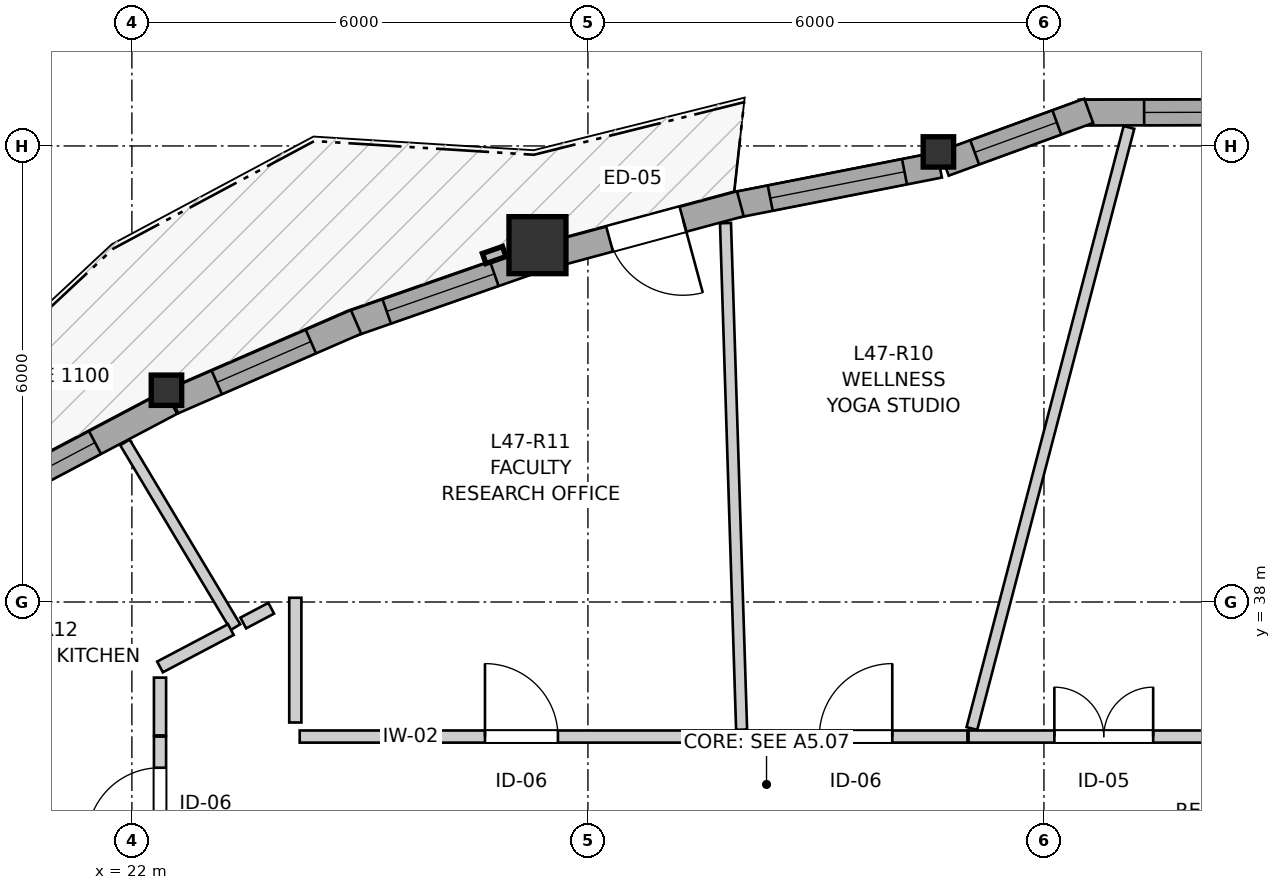
"""IFC4 building model, lengths in metres.
Left out: names, types, materials, properties, quantities, classifications, styles, units other than length and angle.
Written with IfcOpenShell. Run it as: python <this file> out.ifc"""

import sys

from ifc_helpers import new_model, si_unit, direction, frame, frame_2d, origin, origin_2d, place, context, subcontext, project, spatial, rectangle, i_section, extrude, source, transform, mapped, element, fill, save


model = new_model("IFC4")
c1 = context("Model", 3, precision=1e-05, world=origin(), true_north=direction((0.0, 1.0)))
c2 = subcontext(c1, "Body", "Model", "MODEL_VIEW")
j1 = project(units=[si_unit("LENGTHUNIT", "METRE"), si_unit("PLANEANGLEUNIT", "RADIAN")], contexts=[c1])
p1 = place(None, origin())
s1 = spatial("IfcSite", under=j1, at=p1, CompositionType="ELEMENT")
p2 = place(p1, origin())
s2 = spatial("IfcBuilding", under=s1, at=p2, CompositionType="ELEMENT")
p3 = place(p2, frame((0.0, 0.0, 158.6)))
s3 = spatial("IfcBuildingStorey", under=s2, at=p3, CompositionType="ELEMENT", Elevation=158.6)
m1 = source(origin(), c2, "Body", "SweptSolid", [
    extrude(i_section(OverallWidth=0.401, OverallDepth=0.399, WebThickness=0.023, FlangeThickness=0.036, FilletRadius=0.015, at=origin_2d()), origin(), (0.0, 0.0, 1.0), 2.95),
])
p4 = place(p3, frame((32.611, 43.922, 0.0), z_axis=(0.0, 0.0, 1.0), x_axis=(1.0, 0.0, 0.0)))
e1 = element("IfcColumn", 1, at=p4, inside=s3, PredefinedType="PILASTER", context=c2, shape_type="MappedRepresentation", body=[
    mapped(m1, transform((0.0, 0.0, 0.0), x_axis=(1.0, 0.0, 0.0), y_axis=(0.0, 1.0, 0.0), z_axis=(0.0, 0.0, 1.0), scale=1.0)),
])
m2 = source(origin(), c2, "Body", "SweptSolid", [
    extrude(rectangle(XDim=0.75, YDim=0.75, at=origin_2d()), origin(), (0.0, 0.0, 1.0), 2.95),
])
p5 = place(p3, frame((27.336, 42.695, 0.0), z_axis=(0.0, 0.0, 1.0), x_axis=(1.0, 0.0, 0.0)))
e2 = element("IfcColumn", 2, at=p5, inside=s3, PredefinedType="COLUMN", context=c2, shape_type="MappedRepresentation", body=[
    mapped(m2, transform((0.0, 0.0, 0.0), x_axis=(1.0, 0.0, 0.0), y_axis=(0.0, 1.0, 0.0), z_axis=(0.0, 0.0, 1.0), scale=1.0)),
])
p6 = place(p3, frame((22.455, 40.786, 0.0), z_axis=(0.0, 0.0, 1.0), x_axis=(1.0, 0.0, 0.0)))
e3 = element("IfcColumn", 3, at=p6, inside=s3, PredefinedType="PILASTER", context=c2, shape_type="MappedRepresentation", body=[
    mapped(m1, transform((0.0, 0.0, 0.0), x_axis=(1.0, 0.0, 0.0), y_axis=(0.0, 1.0, 0.0), z_axis=(0.0, 0.0, 1.0), scale=1.0)),
])
p7 = place(p3, frame((36.538, 44.444, 0.0), z_axis=(0.0, 0.0, 1.0), x_axis=(-0.999997247411, -0.002346309825, 0.0)))
e4 = element("IfcWall", 4, at=p7, inside=s3, PredefinedType="SOLIDWALL", context=c2, shape_type="SweptSolid", body=[
    extrude(rectangle(XDim=2.081, YDim=0.34, at=frame_2d((1.041, 0.0))), origin(), (0.0, 0.0, 1.0), 2.53),
])
p8 = place(p7, frame((0.271, 0.0, 0.82)))
e5 = element("IfcOpeningElement", 5, at=p8, cuts=e4, PredefinedType="OPENING", context=c2, shape_type="SweptSolid", body=[
    extrude(rectangle(XDim=0.95, YDim=1.35, at=frame_2d((0.475, 0.675))), frame((0.0, 0.18, 0.0), z_axis=(0.0, -1.0, 0.0), x_axis=(1.0, 0.0, 0.0)), (0.0, 0.0, 1.0), 0.36),
])
p9 = place(p3, frame((34.589, 44.462, 0.0), z_axis=(0.0, 0.0, 1.0), x_axis=(-0.939387553708, -0.342857148007, 0.0)))
e6 = element("IfcWall", 6, at=p9, inside=s3, PredefinedType="SOLIDWALL", context=c2, shape_type="SweptSolid", body=[
    extrude(rectangle(XDim=2.023, YDim=0.34, at=frame_2d((1.011, 0.0))), origin(), (0.0, 0.0, 1.0), 2.53),
])
p10 = place(p9, frame((0.447, 0.0, 0.82)))
e7 = element("IfcOpeningElement", 7, at=p10, cuts=e6, PredefinedType="OPENING", context=c2, shape_type="SweptSolid", body=[
    extrude(rectangle(XDim=1.15, YDim=1.2, at=frame_2d((0.575, 0.6))), frame((0.0, 0.18, 0.0), z_axis=(0.0, -1.0, 0.0), x_axis=(1.0, 0.0, 0.0)), (0.0, 0.0, 1.0), 0.36),
])
p11 = place(p3, frame((32.625, 43.751, 0.0), z_axis=(0.0, 0.0, 1.0), x_axis=(-0.981232663103, -0.192827541756, 0.0)))
e8 = element("IfcWall", 8, at=p11, inside=s3, PredefinedType="SOLIDWALL", context=c2, shape_type="SweptSolid", body=[
    extrude(rectangle(XDim=2.756, YDim=0.34, at=frame_2d((1.378, 0.0))), origin(), (0.0, 0.0, 1.0), 2.53),
])
p12 = place(p11, frame((0.468, 0.0, 0.82)))
e9 = element("IfcOpeningElement", 9, at=p12, cuts=e8, PredefinedType="OPENING", context=c2, shape_type="SweptSolid", body=[
    extrude(rectangle(XDim=1.8, YDim=1.45, at=frame_2d((0.9, 0.725))), frame((0.0, 0.18, 0.0), z_axis=(0.0, -1.0, 0.0), x_axis=(1.0, 0.0, 0.0)), (0.0, 0.0, 1.0), 0.36),
])
p13 = place(p3, frame((30.006, 43.24, 0.0), z_axis=(0.0, 0.0, 1.0), x_axis=(-0.965448248334, -0.260594857563, 0.0)))
e10 = element("IfcWall", 10, at=p13, inside=s3, PredefinedType="SOLIDWALL", context=c2, shape_type="SweptSolid", body=[
    extrude(rectangle(XDim=2.564, YDim=0.34, at=frame_2d((1.282, 0.0))), origin(), (0.0, 0.0, 1.0), 2.53),
])
p14 = place(p13, frame((0.782, 0.0, 0.0)))
e11 = element("IfcOpeningElement", 11, at=p14, cuts=e10, PredefinedType="OPENING", context=c2, shape_type="SweptSolid", body=[
    extrude(rectangle(XDim=1.0, YDim=2.1, at=frame_2d((0.5, 1.05))), frame((0.0, 0.18, 0.0), z_axis=(0.0, -1.0, 0.0), x_axis=(1.0, 0.0, 0.0)), (0.0, 0.0, 1.0), 0.36),
])
p15 = place(p3, frame((27.246, 42.483, 0.0), z_axis=(0.0, 0.0, 1.0), x_axis=(-0.944132901201, -0.32956496305, 0.0)))
e12 = element("IfcWall", 12, at=p15, inside=s3, PredefinedType="SOLIDWALL", context=c2, shape_type="SweptSolid", body=[
    extrude(rectangle(XDim=2.52, YDim=0.34, at=frame_2d((1.26, 0.0))), origin(), (0.0, 0.0, 1.0), 2.53),
])
p16 = place(p15, frame((0.505, 0.0, 0.82)))
e13 = element("IfcOpeningElement", 13, at=p16, cuts=e12, PredefinedType="OPENING", context=c2, shape_type="SweptSolid", body=[
    extrude(rectangle(XDim=1.5, YDim=1.45, at=frame_2d((0.75, 0.725))), frame((0.0, 0.18, 0.0), z_axis=(0.0, -1.0, 0.0), x_axis=(1.0, 0.0, 0.0)), (0.0, 0.0, 1.0), 0.36),
])
p17 = place(p3, frame((24.949, 41.685, 0.0), z_axis=(0.0, 0.0, 1.0), x_axis=(-0.917112921707, -0.398627506373, 0.0)))
e14 = element("IfcWall", 14, at=p17, inside=s3, PredefinedType="SOLIDWALL", context=c2, shape_type="SweptSolid", body=[
    extrude(rectangle(XDim=2.625, YDim=0.34, at=frame_2d((1.313, 0.0))), origin(), (0.0, 0.0, 1.0), 2.53),
])
p18 = place(p17, frame((0.648, 0.0, 0.82)))
e15 = element("IfcOpeningElement", 15, at=p18, cuts=e14, PredefinedType="OPENING", context=c2, shape_type="SweptSolid", body=[
    extrude(rectangle(XDim=1.35, YDim=1.45, at=frame_2d((0.675, 0.725))), frame((0.0, 0.18, 0.0), z_axis=(0.0, -1.0, 0.0), x_axis=(1.0, 0.0, 0.0)), (0.0, 0.0, 1.0), 0.36),
])
p19 = place(p3, frame((22.517, 40.627, 0.0), z_axis=(0.0, 0.0, 1.0), x_axis=(-0.884374030812, -0.466778934427, 0.0)))
e16 = element("IfcWall", 16, at=p19, inside=s3, PredefinedType="SOLIDWALL", context=c2, shape_type="SweptSolid", body=[
    extrude(rectangle(XDim=2.611, YDim=0.34, at=frame_2d((1.306, 0.0))), origin(), (0.0, 0.0, 1.0), 2.53),
])
p20 = place(p19, frame((1.133, 0.0, 0.82)))
e17 = element("IfcOpeningElement", 17, at=p20, cuts=e16, PredefinedType="OPENING", context=c2, shape_type="SweptSolid", body=[
    extrude(rectangle(XDim=1.05, YDim=1.45, at=frame_2d((0.525, 0.725))), frame((0.0, 0.18, 0.0), z_axis=(0.0, -1.0, 0.0), x_axis=(1.0, 0.0, 0.0)), (0.0, 0.0, 1.0), 0.36),
])
p21 = place(p3, frame((24.208, 36.23, 0.0), z_axis=(0.0, 0.0, 1.0), x_axis=(1.0, 0.0, 0.0)))
e18 = element("IfcWall", 18, at=p21, inside=s3, PredefinedType="PARTITIONING", context=c2, shape_type="SweptSolid", body=[
    extrude(rectangle(XDim=5.832, YDim=0.16, at=frame_2d((2.916, 0.0))), origin(), (0.0, 0.0, 1.0), 2.95),
])
p22 = place(p21, frame((2.438, 0.0, 0.0)))
e19 = element("IfcOpeningElement", 19, at=p22, cuts=e18, PredefinedType="OPENING", context=c2, shape_type="SweptSolid", body=[
    extrude(rectangle(XDim=0.96, YDim=2.1, at=frame_2d((0.48, 1.05))), frame((0.0, 0.09, 0.0), z_axis=(0.0, -1.0, 0.0), x_axis=(1.0, 0.0, 0.0)), (0.0, 0.0, 1.0), 0.18),
])
p23 = place(p3, frame((33.008, 36.23, 0.0), z_axis=(0.0, 0.0, 1.0), x_axis=(1.0, 0.0, 0.0)))
e20 = element("IfcWall", 20, at=p23, inside=s3, PredefinedType="PARTITIONING", context=c2, shape_type="SweptSolid", body=[
    extrude(rectangle(XDim=3.542, YDim=0.16, at=frame_2d((1.771, 0.0))), origin(), (0.0, 0.0, 1.0), 2.588),
])
p24 = place(p23, frame((1.129, 0.0, 0.0)))
e21 = element("IfcOpeningElement", 21, at=p24, cuts=e20, PredefinedType="OPENING", context=c2, shape_type="SweptSolid", body=[
    extrude(rectangle(XDim=1.3, YDim=2.1, at=frame_2d((0.65, 1.05))), frame((0.0, 0.09, 0.0), z_axis=(0.0, -1.0, 0.0), x_axis=(1.0, 0.0, 0.0)), (0.0, 0.0, 1.0), 0.18),
])
p25 = place(p3, frame((30.055, 36.23, 0.0), z_axis=(0.0, 0.0, 1.0), x_axis=(1.0, 0.0, 0.0)))
e22 = element("IfcWall", 22, at=p25, inside=s3, PredefinedType="PARTITIONING", context=c2, shape_type="SweptSolid", body=[
    extrude(rectangle(XDim=2.938, YDim=0.16, at=frame_2d((1.469, 0.0))), origin(), (0.0, 0.0, 1.0), 2.588),
])
p26 = place(p25, frame((0.99, 0.0, 0.0)))
e23 = element("IfcOpeningElement", 23, at=p26, cuts=e22, PredefinedType="OPENING", context=c2, shape_type="SweptSolid", body=[
    extrude(rectangle(XDim=0.96, YDim=2.1, at=frame_2d((0.48, 1.05))), frame((0.0, 0.09, 0.0), z_axis=(0.0, -1.0, 0.0), x_axis=(1.0, 0.0, 0.0)), (0.0, 0.0, 1.0), 0.18),
])
p27 = place(p3, frame((22.37, 34.45, 0.0), z_axis=(0.0, 0.0, 1.0), x_axis=(0.0, 1.0, 0.0)))
e24 = element("IfcWall", 24, at=p27, inside=s3, PredefinedType="PARTITIONING", context=c2, shape_type="SweptSolid", body=[
    extrude(rectangle(XDim=1.78, YDim=0.16, at=frame_2d((0.89, 0.0))), origin(), (0.0, 0.0, 1.0), 2.95),
])
p28 = place(p27, frame((0.41, 0.0, 0.0)))
e25 = element("IfcOpeningElement", 25, at=p28, cuts=e24, PredefinedType="OPENING", context=c2, shape_type="SweptSolid", body=[
    extrude(rectangle(XDim=0.96, YDim=2.1, at=frame_2d((0.48, 1.05))), frame((0.0, 0.09, 0.0), z_axis=(0.0, -1.0, 0.0), x_axis=(1.0, 0.0, 0.0)), (0.0, 0.0, 1.0), 0.18),
])
p29 = place(p3, frame((33.052, 36.336, 0.0), z_axis=(0.0, 0.0, 1.0), x_axis=(0.252838925964, 0.967508386277, 0.0)))
e26 = element("IfcWall", 26, at=p29, inside=s3, PredefinedType="PARTITIONING", context=c2, shape_type="SweptSolid", body=[
    extrude(rectangle(XDim=8.174, YDim=0.145, at=frame_2d((4.087, 0.0))), origin(), (0.0, 0.0, 1.0), 2.95),
])
p30 = place(p3, frame((29.81, 42.985, 0.0), z_axis=(0.0, 0.0, 1.0), x_axis=(0.031815387529, -0.99949376242, 0.0)))
e27 = element("IfcWall", 27, at=p30, inside=s3, PredefinedType="PARTITIONING", context=c2, shape_type="SweptSolid", body=[
    extrude(rectangle(XDim=6.668, YDim=0.145, at=frame_2d((3.334, 0.0))), origin(), (0.0, 0.0, 1.0), 2.95),
])
p31 = place(p3, frame((17.545, 37.432, 0.0), z_axis=(0.0, 0.0, 1.0), x_axis=(0.745965905636, -0.665984134668, 0.0)))
e28 = element("IfcWall", 28, at=p31, inside=s3, PredefinedType="PARTITIONING", context=c2, shape_type="SweptSolid", body=[
    extrude(rectangle(XDim=6.288, YDim=0.145, at=frame_2d((3.144, 0.0))), origin(), (0.0, 0.0, 1.0), 2.95),
])
p32 = place(p3, frame((21.908, 40.1, 0.0), z_axis=(0.0, 0.0, 1.0), x_axis=(0.513582752497, -0.85804006686, 0.0)))
e29 = element("IfcWall", 29, at=p32, inside=s3, PredefinedType="PARTITIONING", context=c2, shape_type="SweptSolid", body=[
    extrude(rectangle(XDim=2.832, YDim=0.145, at=frame_2d((1.416, 0.0))), origin(), (0.0, 0.0, 1.0), 2.95),
])
p33 = place(p3, frame((24.15, 36.415, 0.0), z_axis=(0.0, 0.0, 1.0), x_axis=(0.0, 1.0, 0.0)))
e30 = element("IfcWall", 30, at=p33, inside=s3, PredefinedType="PARTITIONING", context=c2, shape_type="SweptSolid", body=[
    extrude(rectangle(XDim=1.641, YDim=0.16, at=frame_2d((0.82, 0.0))), origin(), (0.0, 0.0, 1.0), 2.95),
])
p34 = place(p3, frame((22.37, 37.146, 0.0), z_axis=(0.0, 0.0, 1.0), x_axis=(0.884530854714, 0.46648168995, 0.0)))
e31 = element("IfcWall", 31, at=p34, inside=s3, PredefinedType="PARTITIONING", context=c2, shape_type="SweptSolid", body=[
    extrude(rectangle(XDim=1.053, YDim=0.16, at=frame_2d((0.527, 0.0))), origin(), (0.0, 0.0, 1.0), 2.558),
])
p35 = place(p3, frame((22.37, 36.245, 0.0), z_axis=(0.0, 0.0, 1.0), x_axis=(0.0, 1.0, 0.0)))
e32 = element("IfcWall", 32, at=p35, inside=s3, PredefinedType="PARTITIONING", context=c2, shape_type="SweptSolid", body=[
    extrude(rectangle(XDim=0.76, YDim=0.16, at=frame_2d((0.38, 0.0))), origin(), (0.0, 0.0, 1.0), 2.95),
])
p36 = place(p3, frame((23.465, 37.724, 0.0), z_axis=(0.0, 0.0, 1.0), x_axis=(0.884344349775, 0.466835164722, 0.0)))
e33 = element("IfcWall", 33, at=p36, inside=s3, PredefinedType="PARTITIONING", context=c2, shape_type="SweptSolid", body=[
    extrude(rectangle(XDim=0.416, YDim=0.16, at=frame_2d((0.208, 0.0))), origin(), (0.0, 0.0, 1.0), 2.558),
])
m3 = source(origin(), c2, "Body", "SweptSolid", [
    extrude(rectangle(XDim=0.95, YDim=1.35, at=frame_2d((0.475, 0.675))), frame((0.0, 0.03, 0.0), z_axis=(0.0, -1.0, 0.0), x_axis=(1.0, 0.0, 0.0)), (0.0, 0.0, 1.0), 0.06),
])
p37 = place(p8, origin())
e34 = element("IfcWindow", 34, at=p37, inside=s3, PartitioningType="SINGLE_PANEL", PredefinedType="WINDOW", context=c2, shape_type="MappedRepresentation", body=[
    mapped(m3, transform((0.0, 0.0, 0.0), x_axis=(1.0, 0.0, 0.0), y_axis=(0.0, 1.0, 0.0), z_axis=(0.0, 0.0, 1.0), scale=1.0)),
])
fill(e5, e34)
m4 = source(origin(), c2, "Body", "SweptSolid", [
    extrude(rectangle(XDim=1.15, YDim=1.2, at=frame_2d((0.575, 0.6))), frame((0.0, 0.03, 0.0), z_axis=(0.0, -1.0, 0.0), x_axis=(1.0, 0.0, 0.0)), (0.0, 0.0, 1.0), 0.06),
])
p38 = place(p10, origin())
e35 = element("IfcWindow", 35, at=p38, inside=s3, PartitioningType="SINGLE_PANEL", PredefinedType="WINDOW", context=c2, shape_type="MappedRepresentation", body=[
    mapped(m4, transform((0.0, 0.0, 0.0), x_axis=(1.0, 0.0, 0.0), y_axis=(0.0, 1.0, 0.0), z_axis=(0.0, 0.0, 1.0), scale=1.0)),
])
fill(e7, e35)
m5 = source(origin(), c2, "Body", "SweptSolid", [
    extrude(rectangle(XDim=1.8, YDim=1.45, at=frame_2d((0.9, 0.725))), frame((0.0, 0.03, 0.0), z_axis=(0.0, -1.0, 0.0), x_axis=(1.0, 0.0, 0.0)), (0.0, 0.0, 1.0), 0.06),
])
p39 = place(p12, origin())
e36 = element("IfcWindow", 36, at=p39, inside=s3, PartitioningType="SINGLE_PANEL", PredefinedType="WINDOW", context=c2, shape_type="MappedRepresentation", body=[
    mapped(m5, transform((0.0, 0.0, 0.0), x_axis=(1.0, 0.0, 0.0), y_axis=(0.0, 1.0, 0.0), z_axis=(0.0, 0.0, 1.0), scale=1.0)),
])
fill(e9, e36)
m6 = source(origin(), c2, "Body", "SweptSolid", [
    extrude(rectangle(XDim=1.5, YDim=1.45, at=frame_2d((0.75, 0.725))), frame((0.0, 0.03, 0.0), z_axis=(0.0, -1.0, 0.0), x_axis=(1.0, 0.0, 0.0)), (0.0, 0.0, 1.0), 0.06),
])
p40 = place(p16, origin())
e37 = element("IfcWindow", 37, at=p40, inside=s3, PartitioningType="SINGLE_PANEL", PredefinedType="WINDOW", context=c2, shape_type="MappedRepresentation", body=[
    mapped(m6, transform((0.0, 0.0, 0.0), x_axis=(1.0, 0.0, 0.0), y_axis=(0.0, 1.0, 0.0), z_axis=(0.0, 0.0, 1.0), scale=1.0)),
])
fill(e13, e37)
m7 = source(origin(), c2, "Body", "SweptSolid", [
    extrude(rectangle(XDim=1.35, YDim=1.45, at=frame_2d((0.675, 0.725))), frame((0.0, 0.03, 0.0), z_axis=(0.0, -1.0, 0.0), x_axis=(1.0, 0.0, 0.0)), (0.0, 0.0, 1.0), 0.06),
])
p41 = place(p18, origin())
e38 = element("IfcWindow", 38, at=p41, inside=s3, PartitioningType="SINGLE_PANEL", PredefinedType="WINDOW", context=c2, shape_type="MappedRepresentation", body=[
    mapped(m7, transform((0.0, 0.0, 0.0), x_axis=(1.0, 0.0, 0.0), y_axis=(0.0, 1.0, 0.0), z_axis=(0.0, 0.0, 1.0), scale=1.0)),
])
fill(e15, e38)
m8 = source(origin(), c2, "Body", "SweptSolid", [
    extrude(rectangle(XDim=1.05, YDim=1.45, at=frame_2d((0.525, 0.725))), frame((0.0, 0.03, 0.0), z_axis=(0.0, -1.0, 0.0), x_axis=(1.0, 0.0, 0.0)), (0.0, 0.0, 1.0), 0.06),
])
p42 = place(p20, origin())
e39 = element("IfcWindow", 39, at=p42, inside=s3, PartitioningType="SINGLE_PANEL", PredefinedType="WINDOW", context=c2, shape_type="MappedRepresentation", body=[
    mapped(m8, transform((0.0, 0.0, 0.0), x_axis=(1.0, 0.0, 0.0), y_axis=(0.0, 1.0, 0.0), z_axis=(0.0, 0.0, 1.0), scale=1.0)),
])
fill(e17, e39)
m9 = source(origin(), c2, "Body", "SweptSolid", [
    extrude(rectangle(XDim=1.0, YDim=2.1, at=frame_2d((0.5, 1.05))), frame((0.0, 0.025, 0.0), z_axis=(0.0, -1.0, 0.0), x_axis=(1.0, 0.0, 0.0)), (0.0, 0.0, 1.0), 0.05),
])
p43 = place(p14, origin())
e40 = element("IfcDoor", 40, at=p43, inside=s3, OperationType="SINGLE_SWING_LEFT", PredefinedType="DOOR", context=c2, shape_type="MappedRepresentation", body=[
    mapped(m9, transform((0.0, 0.0, 0.0), x_axis=(1.0, 0.0, 0.0), y_axis=(0.0, 1.0, 0.0), z_axis=(0.0, 0.0, 1.0), scale=1.0)),
])
fill(e11, e40)
m10 = source(origin(), c2, "Body", "SweptSolid", [
    extrude(rectangle(XDim=0.96, YDim=2.1, at=frame_2d((0.48, 1.05))), frame((0.0, 0.025, 0.0), z_axis=(0.0, -1.0, 0.0), x_axis=(1.0, 0.0, 0.0)), (0.0, 0.0, 1.0), 0.05),
])
p44 = place(p22, origin())
e41 = element("IfcDoor", 41, at=p44, inside=s3, OperationType="SINGLE_SWING_LEFT", PredefinedType="DOOR", context=c2, shape_type="MappedRepresentation", body=[
    mapped(m10, transform((0.0, 0.0, 0.0), x_axis=(1.0, 0.0, 0.0), y_axis=(0.0, 1.0, 0.0), z_axis=(0.0, 0.0, 1.0), scale=1.0)),
])
fill(e19, e41)
m11 = source(origin(), c2, "Body", "SweptSolid", [
    extrude(rectangle(XDim=1.3, YDim=2.1, at=frame_2d((0.65, 1.05))), frame((0.0, 0.025, 0.0), z_axis=(0.0, -1.0, 0.0), x_axis=(1.0, 0.0, 0.0)), (0.0, 0.0, 1.0), 0.05),
])
p45 = place(p24, origin())
e42 = element("IfcDoor", 42, at=p45, inside=s3, OperationType="DOUBLE_DOOR_SINGLE_SWING", PredefinedType="DOOR", context=c2, shape_type="MappedRepresentation", body=[
    mapped(m11, transform((0.0, 0.0, 0.0), x_axis=(1.0, 0.0, 0.0), y_axis=(0.0, 1.0, 0.0), z_axis=(0.0, 0.0, 1.0), scale=1.0)),
])
fill(e21, e42)
p46 = place(p26, origin())
e43 = element("IfcDoor", 43, at=p46, inside=s3, OperationType="SINGLE_SWING_RIGHT", PredefinedType="DOOR", context=c2, shape_type="MappedRepresentation", body=[
    mapped(m10, transform((0.0, 0.0, 0.0), x_axis=(1.0, 0.0, 0.0), y_axis=(0.0, 1.0, 0.0), z_axis=(0.0, 0.0, 1.0), scale=1.0)),
])
fill(e23, e43)
p47 = place(p28, origin())
e44 = element("IfcDoor", 44, at=p47, inside=s3, OperationType="SINGLE_SWING_LEFT", PredefinedType="DOOR", context=c2, shape_type="MappedRepresentation", body=[
    mapped(m10, transform((0.0, 0.0, 0.0), x_axis=(1.0, 0.0, 0.0), y_axis=(0.0, 1.0, 0.0), z_axis=(0.0, 0.0, 1.0), scale=1.0)),
])
fill(e25, e44)
save(model, sys.argv[1])
